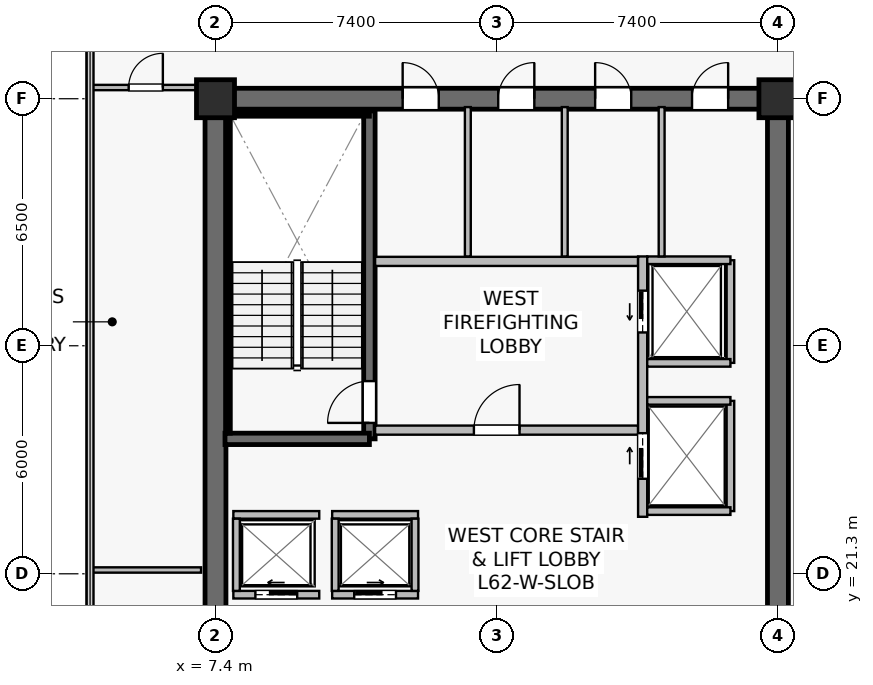
"""IFC4 building model, lengths in metres.
Left out: names, types, materials, properties, quantities, classifications, styles, units other than length and angle.
Written with IfcOpenShell. Run it as: python <this file> out.ifc"""

import sys

from ifc_helpers import new_model, si_unit, direction, frame, frame_2d, origin, origin_2d, place, context, subcontext, project, spatial, rectangle, extrude, source, transform, mapped, element, fill, save


model = new_model("IFC4")
c1 = context("Model", 3, precision=1e-05, world=origin(), true_north=direction((0.0, 1.0)))
c2 = subcontext(c1, "Body", "Model", "MODEL_VIEW")
j1 = project(units=[si_unit("LENGTHUNIT", "METRE"), si_unit("PLANEANGLEUNIT", "RADIAN")], contexts=[c1])
p1 = place(None, origin())
s1 = spatial("IfcSite", under=j1, at=p1, CompositionType="ELEMENT")
p2 = place(p1, origin())
s2 = spatial("IfcBuilding", under=s1, at=p2, CompositionType="ELEMENT")
p3 = place(p2, frame((0.0, 0.0, 258.8)))
s3 = spatial("IfcBuildingStorey", under=s2, at=p3, CompositionType="ELEMENT", Elevation=258.8)
p4 = place(p3, frame((7.125, 33.8, 0.0), z_axis=(0.0, 0.0, 1.0), x_axis=(1.0, 0.0, 0.0)))
e1 = element("IfcWall", 1, at=p4, inside=s3, PredefinedType="SHEAR", context=c2, shape_type="SweptSolid", body=[
    extrude(rectangle(XDim=15.35, YDim=0.55, at=frame_2d((7.675, 0.0))), origin(), (0.0, 0.0, 1.0), 3.8),
])
p5 = place(p4, frame((5.2, 0.0, 0.0)))
e2 = element("IfcOpeningElement", 2, at=p5, cuts=e1, PredefinedType="OPENING", context=c2, shape_type="SweptSolid", body=[
    extrude(rectangle(XDim=0.95, YDim=2.15, at=frame_2d((0.475, 1.075))), frame((0.0, 0.285, 0.0), z_axis=(0.0, -1.0, 0.0), x_axis=(1.0, 0.0, 0.0)), (0.0, 0.0, 1.0), 0.57),
])
p6 = place(p4, frame((7.715, 0.0, 0.0)))
e3 = element("IfcOpeningElement", 3, at=p6, cuts=e1, PredefinedType="OPENING", context=c2, shape_type="SweptSolid", body=[
    extrude(rectangle(XDim=0.95, YDim=2.15, at=frame_2d((0.475, 1.075))), frame((0.0, 0.285, 0.0), z_axis=(0.0, -1.0, 0.0), x_axis=(1.0, 0.0, 0.0)), (0.0, 0.0, 1.0), 0.57),
])
p7 = place(p4, frame((10.265, 0.0, 0.0)))
e4 = element("IfcOpeningElement", 4, at=p7, cuts=e1, PredefinedType="OPENING", context=c2, shape_type="SweptSolid", body=[
    extrude(rectangle(XDim=0.95, YDim=2.15, at=frame_2d((0.475, 1.075))), frame((0.0, 0.285, 0.0), z_axis=(0.0, -1.0, 0.0), x_axis=(1.0, 0.0, 0.0)), (0.0, 0.0, 1.0), 0.57),
])
p8 = place(p4, frame((12.815, 0.0, 0.0)))
e5 = element("IfcOpeningElement", 5, at=p8, cuts=e1, PredefinedType="OPENING", context=c2, shape_type="SweptSolid", body=[
    extrude(rectangle(XDim=0.95, YDim=2.15, at=frame_2d((0.475, 1.075))), frame((0.0, 0.285, 0.0), z_axis=(0.0, -1.0, 0.0), x_axis=(1.0, 0.0, 0.0)), (0.0, 0.0, 1.0), 0.57),
])
p9 = place(p3, frame((7.4, 15.075, 0.0), z_axis=(0.0, 0.0, 1.0), x_axis=(0.0, 1.0, 0.0)))
e6 = element("IfcWall", 6, at=p9, inside=s3, PredefinedType="SHEAR", context=c2, shape_type="SweptSolid", body=[
    extrude(rectangle(XDim=18.45, YDim=0.55, at=frame_2d((9.225, 0.0))), origin(), (0.0, 0.0, 1.0), 3.8),
])
p10 = place(p3, frame((22.2, 15.075, 0.0), z_axis=(0.0, 0.0, 1.0), x_axis=(0.0, 1.0, 0.0)))
e7 = element("IfcWall", 7, at=p10, inside=s3, PredefinedType="SHEAR", context=c2, shape_type="SweptSolid", body=[
    extrude(rectangle(XDim=18.45, YDim=0.55, at=frame_2d((9.225, 0.0))), origin(), (0.0, 0.0, 1.0), 3.8),
])
p11 = place(p10, frame((3.475, 0.0, 0.0)))
e8 = element("IfcOpeningElement", 8, at=p11, cuts=e7, PredefinedType="OPENING", context=c2, shape_type="SweptSolid", body=[
    extrude(rectangle(XDim=1.42, YDim=2.2, at=frame_2d((0.71, 1.1))), frame((0.0, 0.285, 0.0), z_axis=(0.0, -1.0, 0.0), x_axis=(1.0, 0.0, 0.0)), (0.0, 0.0, 1.0), 0.57),
])
p12 = place(p3, frame((11.45, 24.85, 0.0), z_axis=(0.0, 0.0, 1.0), x_axis=(0.0, 1.0, 0.0)))
e9 = element("IfcWall", 9, at=p12, inside=s3, PredefinedType="SHEAR", context=c2, shape_type="SweptSolid", body=[
    extrude(rectangle(XDim=8.63, YDim=0.3, at=frame_2d((4.315, 0.0))), origin(), (0.0, 0.0, 1.0), 3.8),
])
p13 = place(p12, frame((0.42, 0.0, 0.0)))
e10 = element("IfcOpeningElement", 10, at=p13, cuts=e9, PredefinedType="OPENING", context=c2, shape_type="SweptSolid", body=[
    extrude(rectangle(XDim=1.1, YDim=2.15, at=frame_2d((0.55, 1.075))), frame((0.0, 0.16, 0.0), z_axis=(0.0, -1.0, 0.0), x_axis=(1.0, 0.0, 0.0)), (0.0, 0.0, 1.0), 0.32),
])
p14 = place(p3, frame((7.65, 24.85, 0.0), z_axis=(0.0, 0.0, 1.0), x_axis=(1.0, 0.0, 0.0)))
e11 = element("IfcWall", 11, at=p14, inside=s3, PredefinedType="SHEAR", context=c2, shape_type="SweptSolid", body=[
    extrude(rectangle(XDim=3.8, YDim=0.3, at=frame_2d((1.9, 0.0))), origin(), (0.0, 0.0, 1.0), 3.8),
])
p15 = place(p3, frame((7.73, 33.4, 0.0), z_axis=(0.0, 0.0, 1.0), x_axis=(1.0, 0.0, 0.0)))
e12 = element("IfcWall", 12, at=p15, inside=s3, PredefinedType="SOLIDWALL", context=c2, shape_type="SweptSolid", body=[
    extrude(rectangle(XDim=3.72, YDim=0.12, at=frame_2d((1.86, 0.0))), origin(), (0.0, 0.0, 1.0), 3.8),
])
p16 = place(p3, frame((7.73, 25.0, 0.0), z_axis=(0.0, 0.0, 1.0), x_axis=(0.0, 1.0, 0.0)))
e13 = element("IfcWall", 13, at=p16, inside=s3, PredefinedType="SOLIDWALL", context=c2, shape_type="SweptSolid", body=[
    extrude(rectangle(XDim=8.32, YDim=0.12, at=frame_2d((4.16, 0.0))), origin(), (0.0, 0.0, 1.0), 3.8),
])
m1 = source(origin(), c2, "Body", "SweptSolid", [
    extrude(rectangle(XDim=1.0, YDim=1.0, at=origin_2d()), origin(), (0.0, 0.0, 1.0), 4.1),
])
for number, where, z_axis, x_axis in (
    (14, (7.4, 33.8, 0.0), (0.0, 0.0, 1.0), (1.0, 0.0, 0.0)),
    (15, (22.2, 33.8, 0.0), (0.0, 0.0, 1.0), (1.0, 0.0, 0.0)),
):
    element("IfcColumn", number, at=place(p3, frame(where, z_axis=z_axis, x_axis=x_axis)), inside=s3, PredefinedType="COLUMN", context=c2, shape_type="MappedRepresentation", body=[
        mapped(m1, transform((0.0, 0.0, 0.0), scale=1.0)),
    ])
p17 = place(p3, frame((11.6, 25.08, 0.0), z_axis=(0.0, 0.0, 1.0), x_axis=(1.0, 0.0, 0.0)))
e16 = element("IfcWall", 16, at=p17, inside=s3, PredefinedType="SOLIDWALL", context=c2, shape_type="SweptSolid", body=[
    extrude(rectangle(XDim=6.92, YDim=0.24, at=frame_2d((3.46, 0.0))), origin(), (0.0, 0.0, 1.0), 3.197),
])
p18 = place(p17, frame((2.6, 0.0, 0.0)))
e17 = element("IfcOpeningElement", 17, at=p18, cuts=e16, PredefinedType="OPENING", context=c2, shape_type="SweptSolid", body=[
    extrude(rectangle(XDim=1.2, YDim=2.16, at=frame_2d((0.6, 1.08))), frame((0.0, 0.13, 0.0), z_axis=(0.0, -1.0, 0.0), x_axis=(1.0, 0.0, 0.0)), (0.0, 0.0, 1.0), 0.26),
])
p19 = place(p3, frame((11.6, 29.52, 0.0), z_axis=(0.0, 0.0, 1.0), x_axis=(1.0, 0.0, 0.0)))
e18 = element("IfcWall", 18, at=p19, inside=s3, PredefinedType="SOLIDWALL", context=c2, shape_type="SweptSolid", body=[
    extrude(rectangle(XDim=6.92, YDim=0.24, at=frame_2d((3.46, 0.0))), origin(), (0.0, 0.0, 1.0), 3.197),
])
p20 = place(p3, frame((18.64, 22.8, 0.0), z_axis=(0.0, 0.0, 1.0), x_axis=(0.0, 1.0, 0.0)))
e19 = element("IfcWall", 19, at=p20, inside=s3, PredefinedType="SOLIDWALL", context=c2, shape_type="SweptSolid", body=[
    extrude(rectangle(XDim=6.85, YDim=0.24, at=frame_2d((3.425, 0.0))), origin(), (0.0, 0.0, 1.0), 2.935),
])
p21 = place(p20, frame((4.85, 0.0, 0.0)))
e20 = element("IfcOpeningElement", 20, at=p21, cuts=e19, PredefinedType="OPENING", context=c2, shape_type="SweptSolid", body=[
    extrude(rectangle(XDim=1.1, YDim=2.22, at=frame_2d((0.55, 1.11))), frame((0.0, 0.13, 0.0), z_axis=(0.0, -1.0, 0.0), x_axis=(1.0, 0.0, 0.0)), (0.0, 0.0, 1.0), 0.26),
])
p22 = place(p20, frame((1.0, 0.0, 0.0)))
e21 = element("IfcOpeningElement", 21, at=p22, cuts=e19, PredefinedType="OPENING", context=c2, shape_type="SweptSolid", body=[
    extrude(rectangle(XDim=1.2, YDim=2.22, at=frame_2d((0.6, 1.11))), frame((0.0, 0.13, 0.0), z_axis=(0.0, -1.0, 0.0), x_axis=(1.0, 0.0, 0.0)), (0.0, 0.0, 1.0), 0.26),
])
p23 = place(p3, frame((7.87, 20.75, 0.0), z_axis=(0.0, 0.0, 1.0), x_axis=(1.0, 0.0, 0.0)))
e22 = element("IfcWall", 22, at=p23, inside=s3, PredefinedType="SOLIDWALL", context=c2, shape_type="SweptSolid", body=[
    extrude(rectangle(XDim=2.26, YDim=0.2, at=frame_2d((1.13, 0.0))), origin(), (0.0, 0.0, 1.0), 3.8),
])
p24 = place(p23, frame((0.58, 0.0, 0.0)))
e23 = element("IfcOpeningElement", 23, at=p24, cuts=e22, PredefinedType="OPENING", context=c2, shape_type="SweptSolid", body=[
    extrude(rectangle(XDim=1.1, YDim=2.22, at=frame_2d((0.55, 1.11))), frame((0.0, 0.11, 0.0), z_axis=(0.0, -1.0, 0.0), x_axis=(1.0, 0.0, 0.0)), (0.0, 0.0, 1.0), 0.22),
])
p25 = place(p3, frame((7.87, 22.85, 0.0), z_axis=(0.0, 0.0, 1.0), x_axis=(1.0, 0.0, 0.0)))
e24 = element("IfcWall", 24, at=p25, inside=s3, PredefinedType="SOLIDWALL", context=c2, shape_type="SweptSolid", body=[
    extrude(rectangle(XDim=2.26, YDim=0.2, at=frame_2d((1.13, 0.0))), origin(), (0.0, 0.0, 1.0), 3.8),
])
p26 = place(p3, frame((7.95, 20.85, 0.0), z_axis=(0.0, 0.0, 1.0), x_axis=(0.0, 1.0, 0.0)))
e25 = element("IfcWall", 25, at=p26, inside=s3, PredefinedType="SOLIDWALL", context=c2, shape_type="SweptSolid", body=[
    extrude(rectangle(XDim=1.9, YDim=0.18, at=frame_2d((0.95, 0.0))), origin(), (0.0, 0.0, 1.0), 3.8),
])
p27 = place(p3, frame((10.47, 20.75, 0.0), z_axis=(0.0, 0.0, 1.0), x_axis=(1.0, 0.0, 0.0)))
e26 = element("IfcWall", 26, at=p27, inside=s3, PredefinedType="SOLIDWALL", context=c2, shape_type="SweptSolid", body=[
    extrude(rectangle(XDim=2.26, YDim=0.2, at=frame_2d((1.13, 0.0))), origin(), (0.0, 0.0, 1.0), 3.8),
])
p28 = place(p27, frame((0.58, 0.0, 0.0)))
e27 = element("IfcOpeningElement", 27, at=p28, cuts=e26, PredefinedType="OPENING", context=c2, shape_type="SweptSolid", body=[
    extrude(rectangle(XDim=1.1, YDim=2.22, at=frame_2d((0.55, 1.11))), frame((0.0, 0.11, 0.0), z_axis=(0.0, -1.0, 0.0), x_axis=(1.0, 0.0, 0.0)), (0.0, 0.0, 1.0), 0.22),
])
p29 = place(p3, frame((10.47, 22.85, 0.0), z_axis=(0.0, 0.0, 1.0), x_axis=(1.0, 0.0, 0.0)))
e28 = element("IfcWall", 28, at=p29, inside=s3, PredefinedType="SOLIDWALL", context=c2, shape_type="SweptSolid", body=[
    extrude(rectangle(XDim=2.26, YDim=0.2, at=frame_2d((1.13, 0.0))), origin(), (0.0, 0.0, 1.0), 3.8),
])
for number, where, z_axis, x_axis in (
    (29, (10.55, 20.85, 0.0), (0.0, 0.0, 1.0), (0.0, 1.0, 0.0)),
    (30, (12.65, 20.85, 0.0), (0.0, 0.0, 1.0), (0.0, 1.0, 0.0)),
):
    element("IfcWall", number, at=place(p3, frame(where, z_axis=z_axis, x_axis=x_axis)), inside=s3, PredefinedType="SOLIDWALL", context=c2, shape_type="SweptSolid", body=[
        extrude(rectangle(XDim=1.9, YDim=0.18, at=frame_2d((0.95, 0.0))), origin(), (0.0, 0.0, 1.0), 3.8),
    ])
p30 = place(p3, frame((20.95, 26.85, 0.0), z_axis=(0.0, 0.0, 1.0), x_axis=(0.0, 1.0, 0.0)))
e31 = element("IfcWall", 31, at=p30, inside=s3, PredefinedType="SOLIDWALL", context=c2, shape_type="SweptSolid", body=[
    extrude(rectangle(XDim=2.7, YDim=0.2, at=frame_2d((1.35, 0.0))), origin(), (0.0, 0.0, 1.0), 3.8),
])
p31 = place(p3, frame((18.76, 29.55, 0.0), z_axis=(0.0, 0.0, 1.0), x_axis=(1.0, 0.0, 0.0)))
e32 = element("IfcWall", 32, at=p31, inside=s3, PredefinedType="SOLIDWALL", context=c2, shape_type="SweptSolid", body=[
    extrude(rectangle(XDim=2.19, YDim=0.2, at=frame_2d((1.095, 0.0))), origin(), (0.0, 0.0, 1.0), 3.8),
])
p32 = place(p3, frame((18.76, 26.85, 0.0), z_axis=(0.0, 0.0, 1.0), x_axis=(1.0, 0.0, 0.0)))
e33 = element("IfcWall", 33, at=p32, inside=s3, PredefinedType="SOLIDWALL", context=c2, shape_type="SweptSolid", body=[
    extrude(rectangle(XDim=2.19, YDim=0.2, at=frame_2d((1.095, 0.0))), origin(), (0.0, 0.0, 1.0), 3.197),
])
p33 = place(p3, frame((20.95, 22.95, 0.0), z_axis=(0.0, 0.0, 1.0), x_axis=(0.0, 1.0, 0.0)))
e34 = element("IfcWall", 34, at=p33, inside=s3, PredefinedType="SOLIDWALL", context=c2, shape_type="SweptSolid", body=[
    extrude(rectangle(XDim=2.9, YDim=0.2, at=frame_2d((1.45, 0.0))), origin(), (0.0, 0.0, 1.0), 2.935),
])
for number, where, z_axis, x_axis in (
    (35, (18.76, 25.85, 0.0), (0.0, 0.0, 1.0), (1.0, 0.0, 0.0)),
    (36, (18.76, 22.95, 0.0), (0.0, 0.0, 1.0), (1.0, 0.0, 0.0)),
):
    element("IfcWall", number, at=place(p3, frame(where, z_axis=z_axis, x_axis=x_axis)), inside=s3, PredefinedType="SOLIDWALL", context=c2, shape_type="SweptSolid", body=[
        extrude(rectangle(XDim=2.19, YDim=0.2, at=frame_2d((1.095, 0.0))), origin(), (0.0, 0.0, 1.0), 3.8),
    ])
for number, where, z_axis, x_axis in (
    (37, (14.04, 29.65, 0.0), (0.0, 0.0, 1.0), (0.0, 1.0, 0.0)),
    (38, (16.59, 29.65, 0.0), (0.0, 0.0, 1.0), (0.0, 1.0, 0.0)),
    (39, (19.14, 29.65, 0.0), (0.0, 0.0, 1.0), (0.0, 1.0, 0.0)),
):
    element("IfcWall", number, at=place(p3, frame(where, z_axis=z_axis, x_axis=x_axis)), inside=s3, PredefinedType="PLUMBINGWALL", context=c2, shape_type="SweptSolid", body=[
        extrude(rectangle(XDim=3.93, YDim=0.155, at=frame_2d((1.965, 0.0))), origin(), (0.0, 0.0, 1.0), 3.8),
    ])
p34 = place(p3, frame((4.11, 21.4, 0.0), z_axis=(0.0, 0.0, 1.0), x_axis=(1.0, 0.0, 0.0)))
e40 = element("IfcWall", 40, at=p34, inside=s3, PredefinedType="PARTITIONING", context=c2, shape_type="SweptSolid", body=[
    extrude(rectangle(XDim=2.91, YDim=0.14, at=frame_2d((1.455, 0.0))), origin(), (0.0, 0.0, 1.0), 3.8),
])
p35 = place(p3, frame((4.11, 34.095, 0.0), z_axis=(0.0, 0.0, 1.0), x_axis=(1.0, 0.0, 0.0)))
e41 = element("IfcWall", 41, at=p35, inside=s3, PredefinedType="PARTITIONING", context=c2, shape_type="SweptSolid", body=[
    extrude(rectangle(XDim=2.91, YDim=0.14, at=frame_2d((1.455, 0.0))), origin(), (0.0, 0.0, 1.0), 3.8),
])
p36 = place(p35, frame((1.005, 0.0, 0.0)))
e42 = element("IfcOpeningElement", 42, at=p36, cuts=e41, PredefinedType="OPENING", context=c2, shape_type="SweptSolid", body=[
    extrude(rectangle(XDim=0.9, YDim=2.1, at=frame_2d((0.45, 1.05))), frame((0.0, 0.08, 0.0), z_axis=(0.0, -1.0, 0.0), x_axis=(1.0, 0.0, 0.0)), (0.0, 0.0, 1.0), 0.16),
])
m2 = source(origin(), c2, "Body", "SweptSolid", [
    extrude(rectangle(XDim=1.1, YDim=2.15, at=frame_2d((0.55, 1.075))), frame((0.0, 0.025, 0.0), z_axis=(0.0, -1.0, 0.0), x_axis=(1.0, 0.0, 0.0)), (0.0, 0.0, 1.0), 0.05),
])
p37 = place(p13, origin())
e43 = element("IfcDoor", 43, at=p37, inside=s3, OperationType="SINGLE_SWING_LEFT", PredefinedType="DOOR", context=c2, shape_type="MappedRepresentation", body=[
    mapped(m2, transform((0.0, 0.0, 0.0), scale=1.0)),
])
fill(e10, e43)
m3 = source(origin(), c2, "Body", "SweptSolid", [
    extrude(rectangle(XDim=1.2, YDim=2.16, at=frame_2d((0.6, 1.08))), frame((0.0, 0.025, 0.0), z_axis=(0.0, -1.0, 0.0), x_axis=(1.0, 0.0, 0.0)), (0.0, 0.0, 1.0), 0.05),
])
p38 = place(p18, origin())
e44 = element("IfcDoor", 44, at=p38, inside=s3, OperationType="SINGLE_SWING_RIGHT", PredefinedType="DOOR", context=c2, shape_type="MappedRepresentation", body=[
    mapped(m3, transform((0.0, 0.0, 0.0), scale=1.0)),
])
fill(e17, e44)
m4 = source(origin(), c2, "Body", "SweptSolid", [
    extrude(rectangle(XDim=1.1, YDim=2.22, at=frame_2d((0.55, 1.11))), frame((0.0, 0.025, 0.0), z_axis=(0.0, -1.0, 0.0), x_axis=(1.0, 0.0, 0.0)), (0.0, 0.0, 1.0), 0.05),
])
p39 = place(p24, origin())
e45 = element("IfcDoor", 45, at=p39, inside=s3, OperationType="SLIDING_TO_LEFT", PredefinedType="USERDEFINED", context=c2, shape_type="MappedRepresentation", body=[
    mapped(m4, transform((0.0, 0.0, 0.0), scale=1.0)),
])
fill(e23, e45)
p40 = place(p28, origin())
e46 = element("IfcDoor", 46, at=p40, inside=s3, OperationType="SLIDING_TO_RIGHT", PredefinedType="USERDEFINED", context=c2, shape_type="MappedRepresentation", body=[
    mapped(m4, transform((0.0, 0.0, 0.0), scale=1.0)),
])
fill(e27, e46)
p41 = place(p21, origin())
e47 = element("IfcDoor", 47, at=p41, inside=s3, OperationType="SLIDING_TO_LEFT", PredefinedType="USERDEFINED", context=c2, shape_type="MappedRepresentation", body=[
    mapped(m4, transform((0.0, 0.0, 0.0), scale=1.0)),
])
fill(e20, e47)
m5 = source(origin(), c2, "Body", "SweptSolid", [
    extrude(rectangle(XDim=1.2, YDim=2.22, at=frame_2d((0.6, 1.11))), frame((0.0, 0.025, 0.0), z_axis=(0.0, -1.0, 0.0), x_axis=(1.0, 0.0, 0.0)), (0.0, 0.0, 1.0), 0.05),
])
p42 = place(p22, origin())
e48 = element("IfcDoor", 48, at=p42, inside=s3, OperationType="SLIDING_TO_RIGHT", PredefinedType="USERDEFINED", context=c2, shape_type="MappedRepresentation", body=[
    mapped(m5, transform((0.0, 0.0, 0.0), scale=1.0)),
])
fill(e21, e48)
m6 = source(origin(), c2, "Body", "SweptSolid", [
    extrude(rectangle(XDim=0.95, YDim=2.15, at=frame_2d((0.475, 1.075))), frame((0.0, 0.025, 0.0), z_axis=(0.0, -1.0, 0.0), x_axis=(1.0, 0.0, 0.0)), (0.0, 0.0, 1.0), 0.05),
])
p43 = place(p5, origin())
e49 = element("IfcDoor", 49, at=p43, inside=s3, OperationType="SINGLE_SWING_LEFT", PredefinedType="DOOR", context=c2, shape_type="MappedRepresentation", body=[
    mapped(m6, transform((0.0, 0.0, 0.0), scale=1.0)),
])
fill(e2, e49)
p44 = place(p6, origin())
e50 = element("IfcDoor", 50, at=p44, inside=s3, OperationType="SINGLE_SWING_RIGHT", PredefinedType="DOOR", context=c2, shape_type="MappedRepresentation", body=[
    mapped(m6, transform((0.0, 0.0, 0.0), scale=1.0)),
])
fill(e3, e50)
p45 = place(p7, origin())
e51 = element("IfcDoor", 51, at=p45, inside=s3, OperationType="SINGLE_SWING_LEFT", PredefinedType="DOOR", context=c2, shape_type="MappedRepresentation", body=[
    mapped(m6, transform((0.0, 0.0, 0.0), scale=1.0)),
])
fill(e4, e51)
p46 = place(p8, origin())
e52 = element("IfcDoor", 52, at=p46, inside=s3, OperationType="SINGLE_SWING_RIGHT", PredefinedType="DOOR", context=c2, shape_type="MappedRepresentation", body=[
    mapped(m6, transform((0.0, 0.0, 0.0), scale=1.0)),
])
fill(e5, e52)
m7 = source(origin(), c2, "Body", "SweptSolid", [
    extrude(rectangle(XDim=0.9, YDim=2.1, at=frame_2d((0.45, 1.05))), frame((0.0, 0.025, 0.0), z_axis=(0.0, -1.0, 0.0), x_axis=(1.0, 0.0, 0.0)), (0.0, 0.0, 1.0), 0.05),
])
p47 = place(p36, origin())
e53 = element("IfcDoor", 53, at=p47, inside=s3, OperationType="SINGLE_SWING_RIGHT", PredefinedType="DOOR", context=c2, shape_type="MappedRepresentation", body=[
    mapped(m7, transform((0.0, 0.0, 0.0), scale=1.0)),
])
fill(e42, e53)
save(model, sys.argv[1])
